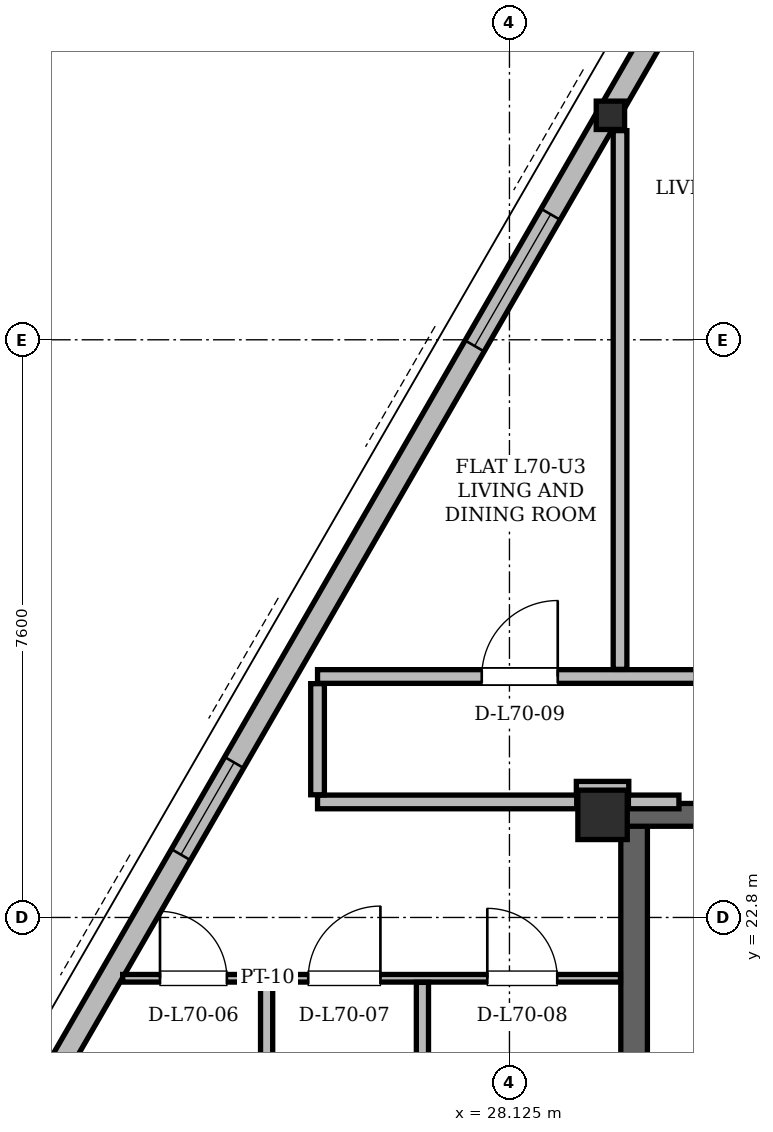
"""IFC4 building model, lengths in metres.
Left out: names, types, materials, properties, quantities, classifications, styles, units other than length and angle.
Written with IfcOpenShell. Run it as: python <this file> out.ifc"""

import sys

from ifc_helpers import new_model, si_unit, direction, frame, frame_2d, origin, origin_2d, place, context, subcontext, project, spatial, rectangle, hollow_rectangle, i_section, extrude, element, fill, save


model = new_model("IFC4")
c1 = context("Model", 3, precision=1e-05, world=origin(), true_north=direction((0.0, 1.0)))
c2 = subcontext(c1, "Body", "Model", "MODEL_VIEW")
j1 = project(units=[si_unit("LENGTHUNIT", "METRE"), si_unit("PLANEANGLEUNIT", "RADIAN")], contexts=[c1])
p1 = place(None, origin())
s1 = spatial("IfcSite", under=j1, at=p1, CompositionType="ELEMENT")
p2 = place(p1, origin())
s2 = spatial("IfcBuilding", under=s1, at=p2, CompositionType="ELEMENT")
p3 = place(p2, frame((0.0, 0.0, 265.5)))
s3 = spatial("IfcBuildingStorey", under=s2, at=p3, CompositionType="ELEMENT", Elevation=265.5)
p4 = place(p3, frame((29.35, 24.15, 0.0), z_axis=(0.0, 0.0, 1.0), x_axis=(1.0, 0.0, 0.0)))
e1 = element("IfcColumn", 1, at=p4, inside=s3, PredefinedType="COLUMN", context=c2, shape_type="SweptSolid", body=[
    extrude(hollow_rectangle(XDim=0.65, YDim=0.65, WallThickness=0.05, at=origin_2d()), origin(), (0.0, 0.0, 1.0), 3.9),
])
p5 = place(p3, frame((29.425, 33.364, 0.004), z_axis=(0.014554637272, -0.005583459988, 0.999878486371), x_axis=(0.358169919381, 0.933656419059, 0.0)))
e2 = element("IfcColumn", 2, at=p5, inside=s3, PredefinedType="COLUMN", context=c2, shape_type="SweptSolid", body=[
    extrude(i_section(OverallWidth=0.373, OverallDepth=0.373, WebThickness=0.016, FlangeThickness=0.026, at=origin_2d()), origin(), (0.0, 0.0, 1.0), 3.892),
])
p6 = place(p3, frame((29.765, 11.0, 0.0), z_axis=(0.0, 0.0, 1.0), x_axis=(0.0, 1.0, 0.0)))
e3 = element("IfcWall", 3, at=p6, inside=s3, PredefinedType="SHEAR", context=c2, shape_type="SweptSolid", body=[
    extrude(rectangle(XDim=13.3, YDim=0.35, at=frame_2d((6.65, 0.0))), origin(), (0.0, 0.0, 1.0), 3.68),
])
p7 = place(p3, frame((29.65, 24.15, 0.0), z_axis=(0.0, 0.0, 1.0), x_axis=(1.0, 0.0, 0.0)))
e4 = element("IfcWall", 4, at=p7, inside=s3, PredefinedType="SHEAR", context=c2, shape_type="SweptSolid", body=[
    extrude(rectangle(XDim=15.7, YDim=0.3, at=frame_2d((7.85, 0.0))), origin(), (0.0, 0.0, 1.0), 3.68),
])
p8 = place(p7, frame((1.7, 0.0, 0.0)))
e5 = element("IfcOpeningElement", 5, at=p8, cuts=e4, PredefinedType="OPENING", context=c2, shape_type="SweptSolid", body=[
    extrude(rectangle(XDim=1.2, YDim=2.2, at=frame_2d((0.6, 1.1))), frame((0.0, 0.15, 0.0), z_axis=(0.0, -1.0, 0.0), x_axis=(1.0, 0.0, 0.0)), (0.0, 0.0, 1.0), 0.3),
])
p9 = place(p7, frame((12.8, 0.0, 0.0)))
e6 = element("IfcOpeningElement", 6, at=p9, cuts=e4, PredefinedType="OPENING", context=c2, shape_type="SweptSolid", body=[
    extrude(rectangle(XDim=1.2, YDim=2.2, at=frame_2d((0.6, 1.1))), frame((0.0, 0.15, 0.0), z_axis=(0.0, -1.0, 0.0), x_axis=(1.0, 0.0, 0.0)), (0.0, 0.0, 1.0), 0.3),
])
p10 = place(p7, frame((6.55, 0.0, 0.0)))
e7 = element("IfcOpeningElement", 7, at=p10, cuts=e4, PredefinedType="OPENING", context=c2, shape_type="SweptSolid", body=[
    extrude(rectangle(XDim=0.9, YDim=2.05, at=frame_2d((0.45, 1.025))), frame((0.0, 0.15, 0.0), z_axis=(0.0, -1.0, 0.0), x_axis=(1.0, 0.0, 0.0)), (0.0, 0.0, 1.0), 0.3),
])
p11 = place(p7, frame((8.45, 0.0, 0.0)))
e8 = element("IfcOpeningElement", 8, at=p11, cuts=e4, PredefinedType="OPENING", context=c2, shape_type="SweptSolid", body=[
    extrude(rectangle(XDim=0.9, YDim=2.05, at=frame_2d((0.45, 1.025))), frame((0.0, 0.15, 0.0), z_axis=(0.0, -1.0, 0.0), x_axis=(1.0, 0.0, 0.0)), (0.0, 0.0, 1.0), 0.3),
])
p12 = place(p3, frame((35.012, 43.042, 0.0), z_axis=(0.0, 0.0, 1.0), x_axis=(-0.49999932964, -0.866025790817, 0.0)))
e9 = element("IfcWall", 9, at=p12, inside=s3, PredefinedType="SOLIDWALL", context=c2, shape_type="SweptSolid", body=[
    extrude(rectangle(XDim=37.248, YDim=0.29, at=frame_2d((18.624, 0.0))), origin(), (0.0, 0.0, 1.0), 3.058),
])
p13 = place(p12, frame((3.639, 0.0, 0.0)))
e10 = element("IfcOpeningElement", 10, at=p13, cuts=e9, PredefinedType="OPENING", context=c2, shape_type="SweptSolid", body=[
    extrude(rectangle(XDim=1.5, YDim=2.2, at=frame_2d((0.75, 1.1))), frame((0.0, 0.145, 0.0), z_axis=(0.0, -1.0, 0.0), x_axis=(1.0, 0.0, 0.0)), (0.0, 0.0, 1.0), 0.29),
])
p14 = place(p12, frame((27.504, 0.0, 0.0)))
e11 = element("IfcOpeningElement", 11, at=p14, cuts=e9, PredefinedType="OPENING", context=c2, shape_type="SweptSolid", body=[
    extrude(rectangle(XDim=1.5, YDim=2.2, at=frame_2d((0.75, 1.1))), frame((0.0, 0.145, 0.0), z_axis=(0.0, -1.0, 0.0), x_axis=(1.0, 0.0, 0.0)), (0.0, 0.0, 1.0), 0.29),
])
p15 = place(p12, frame((35.135, 0.0, 0.85)))
e12 = element("IfcOpeningElement", 12, at=p15, cuts=e9, PredefinedType="OPENING", context=c2, shape_type="SweptSolid", body=[
    extrude(rectangle(XDim=1.2, YDim=1.48, at=frame_2d((0.6, 0.74))), frame((0.0, 0.145, 0.0), z_axis=(0.0, -1.0, 0.0), x_axis=(1.0, 0.0, 0.0)), (0.0, 0.0, 1.0), 0.29),
])
p16 = place(p12, frame((32.321, 0.0, 0.85)))
e13 = element("IfcOpeningElement", 13, at=p16, cuts=e9, PredefinedType="OPENING", context=c2, shape_type="SweptSolid", body=[
    extrude(rectangle(XDim=2.0, YDim=1.8, at=frame_2d((1.0, 0.9))), frame((0.0, 0.145, 0.0), z_axis=(0.0, -1.0, 0.0), x_axis=(1.0, 0.0, 0.0)), (0.0, 0.0, 1.0), 0.29),
])
p17 = place(p12, frame((12.691, 0.0, 0.85)))
e14 = element("IfcOpeningElement", 14, at=p17, cuts=e9, PredefinedType="OPENING", context=c2, shape_type="SweptSolid", body=[
    extrude(rectangle(XDim=2.0, YDim=1.8, at=frame_2d((1.0, 0.9))), frame((0.0, 0.145, 0.0), z_axis=(0.0, -1.0, 0.0), x_axis=(1.0, 0.0, 0.0)), (0.0, 0.0, 1.0), 0.29),
])
p18 = place(p12, frame((21.019, 0.0, 0.85)))
e15 = element("IfcOpeningElement", 15, at=p18, cuts=e9, PredefinedType="OPENING", context=c2, shape_type="SweptSolid", body=[
    extrude(rectangle(XDim=1.4, YDim=1.6, at=frame_2d((0.7, 0.8))), frame((0.0, 0.145, 0.0), z_axis=(0.0, -1.0, 0.0), x_axis=(1.0, 0.0, 0.0)), (0.0, 0.0, 1.0), 0.29),
])
p19 = place(p12, frame((1.529, 0.0, 0.85)))
e16 = element("IfcOpeningElement", 16, at=p19, cuts=e9, PredefinedType="OPENING", context=c2, shape_type="SweptSolid", body=[
    extrude(rectangle(XDim=1.2, YDim=1.48, at=frame_2d((0.6, 0.74))), frame((0.0, 0.145, 0.0), z_axis=(0.0, -1.0, 0.0), x_axis=(1.0, 0.0, 0.0)), (0.0, 0.0, 1.0), 0.29),
])
p20 = place(p12, frame((7.904, 0.0, 0.85)))
e17 = element("IfcOpeningElement", 17, at=p20, cuts=e9, PredefinedType="OPENING", context=c2, shape_type="SweptSolid", body=[
    extrude(rectangle(XDim=2.0, YDim=1.8, at=frame_2d((1.0, 0.9))), frame((0.0, 0.145, 0.0), z_axis=(0.0, -1.0, 0.0), x_axis=(1.0, 0.0, 0.0)), (0.0, 0.0, 1.0), 0.29),
])
p21 = place(p3, frame((23.036, 22.0, 0.0), z_axis=(0.0, 0.0, 1.0), x_axis=(1.0, 0.0, 0.0)))
e18 = element("IfcWall", 18, at=p21, inside=s3, PredefinedType="PARTITIONING", context=c2, shape_type="SweptSolid", body=[
    extrude(rectangle(XDim=6.55, YDim=0.1, at=frame_2d((3.275, 0.0))), origin(), (0.0, 0.0, 1.0), 2.82),
])
p22 = place(p21, frame((0.491, 0.0, 0.0)))
e19 = element("IfcOpeningElement", 19, at=p22, cuts=e18, PredefinedType="OPENING", context=c2, shape_type="SweptSolid", body=[
    extrude(rectangle(XDim=0.88, YDim=2.08, at=frame_2d((0.44, 1.04))), frame((0.0, 0.05, 0.0), z_axis=(0.0, -1.0, 0.0), x_axis=(1.0, 0.0, 0.0)), (0.0, 0.0, 1.0), 0.1),
])
p23 = place(p21, frame((2.441, 0.0, 0.0)))
e20 = element("IfcOpeningElement", 20, at=p23, cuts=e18, PredefinedType="OPENING", context=c2, shape_type="SweptSolid", body=[
    extrude(rectangle(XDim=0.95, YDim=2.1, at=frame_2d((0.475, 1.05))), frame((0.0, 0.05, 0.0), z_axis=(0.0, -1.0, 0.0), x_axis=(1.0, 0.0, 0.0)), (0.0, 0.0, 1.0), 0.1),
])
p24 = place(p21, frame((4.798, 0.0, 0.0)))
e21 = element("IfcOpeningElement", 21, at=p24, cuts=e18, PredefinedType="OPENING", context=c2, shape_type="SweptSolid", body=[
    extrude(rectangle(XDim=0.92, YDim=2.12, at=frame_2d((0.46, 1.06))), frame((0.0, 0.05, 0.0), z_axis=(0.0, -1.0, 0.0), x_axis=(1.0, 0.0, 0.0)), (0.0, 0.0, 1.0), 0.1),
])
p25 = place(p3, frame((25.6, 24.32, 0.0), z_axis=(0.0, 0.0, 1.0), x_axis=(1.0, 0.0, 0.0)))
e22 = element("IfcWall", 22, at=p25, inside=s3, PredefinedType="PARTITIONING", context=c2, shape_type="SweptSolid", body=[
    extrude(rectangle(XDim=3.41, YDim=0.18, at=frame_2d((1.705, 0.0))), origin(), (0.0, 0.0, 1.0), 3.68),
])
p26 = place(p3, frame((29.69, 24.32, 0.0), z_axis=(0.0, 0.0, 1.0), x_axis=(1.0, 0.0, 0.0)))
e23 = element("IfcWall", 23, at=p26, inside=s3, PredefinedType="PARTITIONING", context=c2, shape_type="SweptSolid", body=[
    extrude(rectangle(XDim=0.665, YDim=0.18, at=frame_2d((0.333, 0.0))), origin(), (0.0, 0.0, 1.0), 2.82),
])
p27 = place(p3, frame((29.005, 24.5, 0.0), z_axis=(0.0, 0.0, 1.0), x_axis=(1.0, 0.0, 0.0)))
e24 = element("IfcWall", 24, at=p27, inside=s3, PredefinedType="PARTITIONING", context=c2, shape_type="SweptSolid", body=[
    extrude(rectangle(XDim=0.69, YDim=0.18, at=frame_2d((0.345, 0.0))), origin(), (0.0, 0.0, 1.0), 3.266),
])
p28 = place(p3, frame((25.6, 25.97, 0.0), z_axis=(0.0, 0.0, 1.0), x_axis=(1.0, 0.0, 0.0)))
e25 = element("IfcWall", 25, at=p28, inside=s3, PredefinedType="PARTITIONING", context=c2, shape_type="SweptSolid", body=[
    extrude(rectangle(XDim=21.85, YDim=0.18, at=frame_2d((10.925, 0.0))), origin(), (0.0, 0.0, 1.0), 3.266),
])
p29 = place(p28, frame((2.16, 0.0, 0.0)))
e26 = element("IfcOpeningElement", 26, at=p29, cuts=e25, PredefinedType="OPENING", context=c2, shape_type="SweptSolid", body=[
    extrude(rectangle(XDim=1.0, YDim=2.18, at=frame_2d((0.5, 1.09))), frame((0.0, 0.09, 0.0), z_axis=(0.0, -1.0, 0.0), x_axis=(1.0, 0.0, 0.0)), (0.0, 0.0, 1.0), 0.18),
])
p30 = place(p28, frame((5.991, 0.0, 0.0)))
e27 = element("IfcOpeningElement", 27, at=p30, cuts=e25, PredefinedType="OPENING", context=c2, shape_type="SweptSolid", body=[
    extrude(rectangle(XDim=1.0, YDim=2.18, at=frame_2d((0.5, 1.09))), frame((0.0, 0.09, 0.0), z_axis=(0.0, -1.0, 0.0), x_axis=(1.0, 0.0, 0.0)), (0.0, 0.0, 1.0), 0.18),
])
p31 = place(p28, frame((15.35, 0.0, 0.0)))
e28 = element("IfcOpeningElement", 28, at=p31, cuts=e25, PredefinedType="OPENING", context=c2, shape_type="SweptSolid", body=[
    extrude(rectangle(XDim=1.3, YDim=2.2, at=frame_2d((0.65, 1.1))), frame((0.0, 0.09, 0.0), z_axis=(0.0, -1.0, 0.0), x_axis=(1.0, 0.0, 0.0)), (0.0, 0.0, 1.0), 0.18),
])
p32 = place(p28, frame((18.94, 0.0, 0.0)))
e29 = element("IfcOpeningElement", 29, at=p32, cuts=e25, PredefinedType="OPENING", context=c2, shape_type="SweptSolid", body=[
    extrude(rectangle(XDim=1.0, YDim=2.18, at=frame_2d((0.5, 1.09))), frame((0.0, 0.09, 0.0), z_axis=(0.0, -1.0, 0.0), x_axis=(1.0, 0.0, 0.0)), (0.0, 0.0, 1.0), 0.18),
])
p33 = place(p3, frame((24.93, 17.744, 0.0), z_axis=(0.0, 0.0, 1.0), x_axis=(0.0, 1.0, 0.0)))
e30 = element("IfcWall", 30, at=p33, inside=s3, PredefinedType="PARTITIONING", context=c2, shape_type="SweptSolid", body=[
    extrude(rectangle(XDim=4.202, YDim=0.16, at=frame_2d((2.101, 0.0))), origin(), (0.0, 0.0, 1.0), 3.68),
])
p34 = place(p3, frame((25.6, 24.414, 0.0), z_axis=(0.0, 0.0, 1.0), x_axis=(0.0, 1.0, 0.0)))
e31 = element("IfcWall", 31, at=p34, inside=s3, PredefinedType="PARTITIONING", context=c2, shape_type="SweptSolid", body=[
    extrude(rectangle(XDim=1.462, YDim=0.18, at=frame_2d((0.731, 0.0))), origin(), (0.0, 0.0, 1.0), 3.68),
])
p35 = place(p3, frame((26.98, 17.744, 0.0), z_axis=(0.0, 0.0, 1.0), x_axis=(0.0, 1.0, 0.0)))
e32 = element("IfcWall", 32, at=p35, inside=s3, PredefinedType="PARTITIONING", context=c2, shape_type="SweptSolid", body=[
    extrude(rectangle(XDim=4.202, YDim=0.16, at=frame_2d((2.101, 0.0))), origin(), (0.0, 0.0, 1.0), 3.68),
])
p36 = place(p3, frame((29.58, 26.064, 0.0), z_axis=(0.0, 0.0, 1.0), x_axis=(0.0, 1.0, 0.0)))
e33 = element("IfcWall", 33, at=p36, inside=s3, PredefinedType="PARTITIONING", context=c2, shape_type="SweptSolid", body=[
    extrude(rectangle(XDim=7.088, YDim=0.18, at=frame_2d((3.544, 0.0))), origin(), (0.0, 0.0, 1.0), 3.68),
])
p37 = place(p17, origin())
e34 = element("IfcWindow", 34, at=p37, inside=s3, PartitioningType="SINGLE_PANEL", PredefinedType="WINDOW", context=c2, shape_type="SweptSolid", body=[
    extrude(rectangle(XDim=2.0, YDim=1.8, at=frame_2d((1.0, 0.9))), frame((0.0, 0.03, 0.0), z_axis=(0.0, -1.0, 0.0), x_axis=(1.0, 0.0, 0.0)), (0.0, 0.0, 1.0), 0.06),
])
fill(e14, e34)
p38 = place(p18, origin())
e35 = element("IfcWindow", 35, at=p38, inside=s3, PartitioningType="SINGLE_PANEL", PredefinedType="WINDOW", context=c2, shape_type="SweptSolid", body=[
    extrude(rectangle(XDim=1.4, YDim=1.6, at=frame_2d((0.7, 0.8))), frame((0.0, 0.03, 0.0), z_axis=(0.0, -1.0, 0.0), x_axis=(1.0, 0.0, 0.0)), (0.0, 0.0, 1.0), 0.06),
])
fill(e15, e35)
p39 = place(p22, origin())
e36 = element("IfcDoor", 36, at=p39, inside=s3, OperationType="SINGLE_SWING_LEFT", PredefinedType="DOOR", context=c2, shape_type="SweptSolid", body=[
    extrude(rectangle(XDim=0.88, YDim=2.08, at=frame_2d((0.44, 1.04))), frame((0.0, 0.025, 0.0), z_axis=(0.0, -1.0, 0.0), x_axis=(1.0, 0.0, 0.0)), (0.0, 0.0, 1.0), 0.05),
])
fill(e19, e36)
p40 = place(p23, origin())
e37 = element("IfcDoor", 37, at=p40, inside=s3, OperationType="SINGLE_SWING_RIGHT", PredefinedType="DOOR", context=c2, shape_type="SweptSolid", body=[
    extrude(rectangle(XDim=0.95, YDim=2.1, at=frame_2d((0.475, 1.05))), frame((0.0, 0.025, 0.0), z_axis=(0.0, -1.0, 0.0), x_axis=(1.0, 0.0, 0.0)), (0.0, 0.0, 1.0), 0.05),
])
fill(e20, e37)
p41 = place(p24, origin())
e38 = element("IfcDoor", 38, at=p41, inside=s3, OperationType="SINGLE_SWING_LEFT", PredefinedType="DOOR", context=c2, shape_type="SweptSolid", body=[
    extrude(rectangle(XDim=0.92, YDim=2.12, at=frame_2d((0.46, 1.06))), frame((0.0, 0.025, 0.0), z_axis=(0.0, -1.0, 0.0), x_axis=(1.0, 0.0, 0.0)), (0.0, 0.0, 1.0), 0.05),
])
fill(e21, e38)
p42 = place(p29, origin())
e39 = element("IfcDoor", 39, at=p42, inside=s3, OperationType="SINGLE_SWING_RIGHT", PredefinedType="DOOR", context=c2, shape_type="SweptSolid", body=[
    extrude(rectangle(XDim=1.0, YDim=2.18, at=frame_2d((0.5, 1.09))), frame((0.0, 0.025, 0.0), z_axis=(0.0, -1.0, 0.0), x_axis=(1.0, 0.0, 0.0)), (0.0, 0.0, 1.0), 0.05),
])
fill(e26, e39)
save(model, sys.argv[1])
